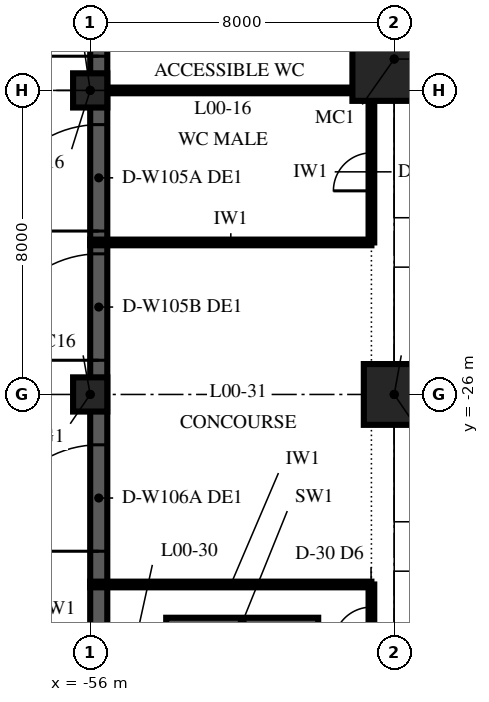
"""IFC4 building model, lengths in metres.
Left out: names, types, materials, properties, quantities, classifications, styles, units other than length and angle.
Written with IfcOpenShell. Run it as: python <this file> out.ifc"""

import sys

from ifc_helpers import new_model, si_unit, direction, frame, frame_2d, origin, origin_2d, place, context, subcontext, project, spatial, rectangle, extrude, element, fill, save


model = new_model("IFC4")
c1 = context("Model", 3, precision=1e-05, world=origin(), true_north=direction((0.0, 1.0)))
c2 = subcontext(c1, "Body", "Model", "MODEL_VIEW")
j1 = project(units=[si_unit("LENGTHUNIT", "METRE"), si_unit("PLANEANGLEUNIT", "RADIAN")], contexts=[c1])
p1 = place(None, origin())
s1 = spatial("IfcSite", under=j1, at=p1, CompositionType="ELEMENT")
p2 = place(p1, origin())
s2 = spatial("IfcBuilding", under=s1, at=p2, CompositionType="ELEMENT")
p3 = place(p2, origin())
s3 = spatial("IfcBuildingStorey", under=s2, at=p3, CompositionType="ELEMENT", Elevation=0.0)
for number, where, z_axis, x_axis in (
    (1, (-56.0, -26.0, 0.0), (0.0, 0.0, 1.0), (1.0, 0.0, 0.0)),
    (2, (-56.0, -18.0, 0.0), (0.0, 0.0, 1.0), (1.0, 0.0, 0.0)),
):
    element("IfcColumn", number, at=place(p3, frame(where, z_axis=z_axis, x_axis=x_axis)), inside=s3, PredefinedType="COLUMN", context=c2, shape_type="SweptSolid", body=[
        extrude(rectangle(XDim=0.9, YDim=0.9, at=origin_2d()), origin(), (0.0, 0.0, 1.0), 6.0),
    ])
p4 = place(p3, frame((-48.0, -26.0, 0.0), z_axis=(0.0, 0.0, 1.0), x_axis=(1.0, 0.0, 0.0)))
e3 = element("IfcColumn", 3, at=p4, inside=s3, PredefinedType="COLUMN", context=c2, shape_type="SweptSolid", body=[
    extrude(rectangle(XDim=1.6, YDim=1.6, at=origin_2d()), origin(), (0.0, 0.0, 1.0), 6.0),
])
p5 = place(p3, frame((-48.0, -17.175, 0.0), z_axis=(0.0, 0.0, 1.0), x_axis=(1.0, 0.0, 0.0)))
e4 = element("IfcColumn", 4, at=p5, inside=s3, PredefinedType="COLUMN", context=c2, shape_type="SweptSolid", body=[
    extrude(rectangle(XDim=2.2, YDim=2.2, at=origin_2d()), origin(), (0.0, 0.0, 1.0), 6.0),
])
p6 = place(p3, frame((-55.775, 8.0, 0.0), z_axis=(0.0, 0.0, 1.0), x_axis=(0.0, -1.0, 0.0)))
e5 = element("IfcWall", 5, at=p6, inside=s3, PredefinedType="SOLIDWALL", context=c2, shape_type="SweptSolid", body=[
    extrude(rectangle(XDim=81.55, YDim=0.45, at=frame_2d((40.775, 0.0))), origin(), (0.0, 0.0, 1.0), 6.0),
])
p7 = place(p6, frame((2.9, 0.0, 0.0)))
e6 = element("IfcOpeningElement", 6, at=p7, cuts=e5, PredefinedType="OPENING", context=c2, shape_type="SweptSolid", body=[
    extrude(rectangle(XDim=2.8, YDim=2.4, at=frame_2d((1.4, 1.2))), frame((0.0, 0.24, 0.0), z_axis=(0.0, -1.0, 0.0), x_axis=(1.0, 0.0, 0.0)), (0.0, 0.0, 1.0), 0.48),
])
p8 = place(p6, frame((6.3, 0.0, 0.0)))
e7 = element("IfcOpeningElement", 7, at=p8, cuts=e5, PredefinedType="OPENING", context=c2, shape_type="SweptSolid", body=[
    extrude(rectangle(XDim=2.8, YDim=2.4, at=frame_2d((1.4, 1.2))), frame((0.0, 0.24, 0.0), z_axis=(0.0, -1.0, 0.0), x_axis=(1.0, 0.0, 0.0)), (0.0, 0.0, 1.0), 0.48),
])
p9 = place(p6, frame((10.9, 0.0, 0.0)))
e8 = element("IfcOpeningElement", 8, at=p9, cuts=e5, PredefinedType="OPENING", context=c2, shape_type="SweptSolid", body=[
    extrude(rectangle(XDim=2.8, YDim=2.4, at=frame_2d((1.4, 1.2))), frame((0.0, 0.24, 0.0), z_axis=(0.0, -1.0, 0.0), x_axis=(1.0, 0.0, 0.0)), (0.0, 0.0, 1.0), 0.48),
])
p10 = place(p6, frame((14.3, 0.0, 0.0)))
e9 = element("IfcOpeningElement", 9, at=p10, cuts=e5, PredefinedType="OPENING", context=c2, shape_type="SweptSolid", body=[
    extrude(rectangle(XDim=2.8, YDim=2.4, at=frame_2d((1.4, 1.2))), frame((0.0, 0.24, 0.0), z_axis=(0.0, -1.0, 0.0), x_axis=(1.0, 0.0, 0.0)), (0.0, 0.0, 1.0), 0.48),
])
p11 = place(p6, frame((18.9, 0.0, 0.0)))
e10 = element("IfcOpeningElement", 10, at=p11, cuts=e5, PredefinedType="OPENING", context=c2, shape_type="SweptSolid", body=[
    extrude(rectangle(XDim=2.8, YDim=2.4, at=frame_2d((1.4, 1.2))), frame((0.0, 0.24, 0.0), z_axis=(0.0, -1.0, 0.0), x_axis=(1.0, 0.0, 0.0)), (0.0, 0.0, 1.0), 0.48),
])
p12 = place(p6, frame((22.3, 0.0, 0.0)))
e11 = element("IfcOpeningElement", 11, at=p12, cuts=e5, PredefinedType="OPENING", context=c2, shape_type="SweptSolid", body=[
    extrude(rectangle(XDim=2.8, YDim=2.4, at=frame_2d((1.4, 1.2))), frame((0.0, 0.24, 0.0), z_axis=(0.0, -1.0, 0.0), x_axis=(1.0, 0.0, 0.0)), (0.0, 0.0, 1.0), 0.48),
])
p13 = place(p6, frame((26.9, 0.0, 0.0)))
e12 = element("IfcOpeningElement", 12, at=p13, cuts=e5, PredefinedType="OPENING", context=c2, shape_type="SweptSolid", body=[
    extrude(rectangle(XDim=2.8, YDim=2.4, at=frame_2d((1.4, 1.2))), frame((0.0, 0.24, 0.0), z_axis=(0.0, -1.0, 0.0), x_axis=(1.0, 0.0, 0.0)), (0.0, 0.0, 1.0), 0.48),
])
p14 = place(p6, frame((30.3, 0.0, 0.0)))
e13 = element("IfcOpeningElement", 13, at=p14, cuts=e5, PredefinedType="OPENING", context=c2, shape_type="SweptSolid", body=[
    extrude(rectangle(XDim=2.8, YDim=2.4, at=frame_2d((1.4, 1.2))), frame((0.0, 0.24, 0.0), z_axis=(0.0, -1.0, 0.0), x_axis=(1.0, 0.0, 0.0)), (0.0, 0.0, 1.0), 0.48),
])
p15 = place(p6, frame((35.325, 0.0, 0.0)))
e14 = element("IfcOpeningElement", 14, at=p15, cuts=e5, PredefinedType="OPENING", context=c2, shape_type="SweptSolid", body=[
    extrude(rectangle(XDim=2.8, YDim=2.4, at=frame_2d((1.4, 1.2))), frame((0.0, 0.24, 0.0), z_axis=(0.0, -1.0, 0.0), x_axis=(1.0, 0.0, 0.0)), (0.0, 0.0, 1.0), 0.48),
])
p16 = place(p6, frame((42.9, 0.0, 0.0)))
e15 = element("IfcOpeningElement", 15, at=p16, cuts=e5, PredefinedType="OPENING", context=c2, shape_type="SweptSolid", body=[
    extrude(rectangle(XDim=2.8, YDim=2.4, at=frame_2d((1.4, 1.2))), frame((0.0, 0.24, 0.0), z_axis=(0.0, -1.0, 0.0), x_axis=(1.0, 0.0, 0.0)), (0.0, 0.0, 1.0), 0.48),
])
p17 = place(p6, frame((46.3, 0.0, 0.0)))
e16 = element("IfcOpeningElement", 16, at=p17, cuts=e5, PredefinedType="OPENING", context=c2, shape_type="SweptSolid", body=[
    extrude(rectangle(XDim=2.8, YDim=2.4, at=frame_2d((1.4, 1.2))), frame((0.0, 0.24, 0.0), z_axis=(0.0, -1.0, 0.0), x_axis=(1.0, 0.0, 0.0)), (0.0, 0.0, 1.0), 0.48),
])
p18 = place(p6, frame((50.9, 0.0, 0.0)))
e17 = element("IfcOpeningElement", 17, at=p18, cuts=e5, PredefinedType="OPENING", context=c2, shape_type="SweptSolid", body=[
    extrude(rectangle(XDim=2.8, YDim=2.4, at=frame_2d((1.4, 1.2))), frame((0.0, 0.24, 0.0), z_axis=(0.0, -1.0, 0.0), x_axis=(1.0, 0.0, 0.0)), (0.0, 0.0, 1.0), 0.48),
])
p19 = place(p6, frame((54.3, 0.0, 0.0)))
e18 = element("IfcOpeningElement", 18, at=p19, cuts=e5, PredefinedType="OPENING", context=c2, shape_type="SweptSolid", body=[
    extrude(rectangle(XDim=2.8, YDim=2.4, at=frame_2d((1.4, 1.2))), frame((0.0, 0.24, 0.0), z_axis=(0.0, -1.0, 0.0), x_axis=(1.0, 0.0, 0.0)), (0.0, 0.0, 1.0), 0.48),
])
p20 = place(p6, frame((58.9, 0.0, 0.0)))
e19 = element("IfcOpeningElement", 19, at=p20, cuts=e5, PredefinedType="OPENING", context=c2, shape_type="SweptSolid", body=[
    extrude(rectangle(XDim=2.8, YDim=2.4, at=frame_2d((1.4, 1.2))), frame((0.0, 0.24, 0.0), z_axis=(0.0, -1.0, 0.0), x_axis=(1.0, 0.0, 0.0)), (0.0, 0.0, 1.0), 0.48),
])
p21 = place(p6, frame((62.3, 0.0, 0.0)))
e20 = element("IfcOpeningElement", 20, at=p21, cuts=e5, PredefinedType="OPENING", context=c2, shape_type="SweptSolid", body=[
    extrude(rectangle(XDim=2.8, YDim=2.4, at=frame_2d((1.4, 1.2))), frame((0.0, 0.24, 0.0), z_axis=(0.0, -1.0, 0.0), x_axis=(1.0, 0.0, 0.0)), (0.0, 0.0, 1.0), 0.48),
])
p22 = place(p6, frame((66.9, 0.0, 0.0)))
e21 = element("IfcOpeningElement", 21, at=p22, cuts=e5, PredefinedType="OPENING", context=c2, shape_type="SweptSolid", body=[
    extrude(rectangle(XDim=2.8, YDim=2.4, at=frame_2d((1.4, 1.2))), frame((0.0, 0.24, 0.0), z_axis=(0.0, -1.0, 0.0), x_axis=(1.0, 0.0, 0.0)), (0.0, 0.0, 1.0), 0.48),
])
p23 = place(p6, frame((70.3, 0.0, 0.0)))
e22 = element("IfcOpeningElement", 22, at=p23, cuts=e5, PredefinedType="OPENING", context=c2, shape_type="SweptSolid", body=[
    extrude(rectangle(XDim=2.8, YDim=2.4, at=frame_2d((1.4, 1.2))), frame((0.0, 0.24, 0.0), z_axis=(0.0, -1.0, 0.0), x_axis=(1.0, 0.0, 0.0)), (0.0, 0.0, 1.0), 0.48),
])
p24 = place(p6, frame((74.675, 0.0, 0.0)))
e23 = element("IfcOpeningElement", 23, at=p24, cuts=e5, PredefinedType="OPENING", context=c2, shape_type="SweptSolid", body=[
    extrude(rectangle(XDim=2.8, YDim=2.4, at=frame_2d((1.4, 1.2))), frame((0.0, 0.24, 0.0), z_axis=(0.0, -1.0, 0.0), x_axis=(1.0, 0.0, 0.0)), (0.0, 0.0, 1.0), 0.48),
])
p25 = place(p6, frame((78.075, 0.0, 0.0)))
e24 = element("IfcOpeningElement", 24, at=p25, cuts=e5, PredefinedType="OPENING", context=c2, shape_type="SweptSolid", body=[
    extrude(rectangle(XDim=2.8, YDim=2.4, at=frame_2d((1.4, 1.2))), frame((0.0, 0.24, 0.0), z_axis=(0.0, -1.0, 0.0), x_axis=(1.0, 0.0, 0.0)), (0.0, 0.0, 1.0), 0.48),
])
p26 = place(p3, frame((-50.0, -32.0, 0.0), z_axis=(0.0, 0.0, 1.0), x_axis=(-1.0, 0.0, 0.0)))
e25 = element("IfcWall", 25, at=p26, inside=s3, PredefinedType="SOLIDWALL", context=c2, shape_type="SweptSolid", body=[
    extrude(rectangle(XDim=4.0, YDim=0.25, at=frame_2d((2.0, 0.0))), origin(), (0.0, 0.0, 1.0), 6.0),
])
p27 = place(p3, frame((-48.6, -33.19, 0.0), z_axis=(0.0, 0.0, 1.0), x_axis=(0.0, 1.0, 0.0)))
e26 = element("IfcWall", 26, at=p27, inside=s3, PredefinedType="PARTITIONING", context=c2, shape_type="SweptSolid", body=[
    extrude(rectangle(XDim=2.19, YDim=0.15, at=frame_2d((1.095, 0.0))), origin(), (0.0, 0.0, 1.0), 5.7),
])
p28 = place(p27, frame((0.595, 0.0, 0.0)))
e27 = element("IfcOpeningElement", 27, at=p28, cuts=e26, PredefinedType="OPENING", context=c2, shape_type="SweptSolid", body=[
    extrude(rectangle(XDim=1.0, YDim=2.1, at=frame_2d((0.5, 1.05))), frame((0.0, 0.09, 0.0), z_axis=(0.0, -1.0, 0.0), x_axis=(1.0, 0.0, 0.0)), (0.0, 0.0, 1.0), 0.18),
])
p29 = place(p3, frame((-48.6, -22.0, 0.0), z_axis=(0.0, 0.0, 1.0), x_axis=(0.0, 1.0, 0.0)))
e28 = element("IfcWall", 28, at=p29, inside=s3, PredefinedType="PARTITIONING", context=c2, shape_type="SweptSolid", body=[
    extrude(rectangle(XDim=3.715, YDim=0.15, at=frame_2d((1.857, 0.0))), origin(), (0.0, 0.0, 1.0), 5.7),
])
p30 = place(p29, frame((1.357, 0.0, 0.0)))
e29 = element("IfcOpeningElement", 29, at=p30, cuts=e28, PredefinedType="OPENING", context=c2, shape_type="SweptSolid", body=[
    extrude(rectangle(XDim=1.0, YDim=2.1, at=frame_2d((0.5, 1.05))), frame((0.0, 0.09, 0.0), z_axis=(0.0, -1.0, 0.0), x_axis=(1.0, 0.0, 0.0)), (0.0, 0.0, 1.0), 0.18),
])
for number, where, z_axis, x_axis in (
    (30, (-56.0, -31.0, 0.0), (0.0, 0.0, 1.0), (1.0, 0.0, 0.0)),
    (31, (-56.0, -22.0, 0.0), (0.0, 0.0, 1.0), (1.0, 0.0, 0.0)),
):
    element("IfcWall", number, at=place(p3, frame(where, z_axis=z_axis, x_axis=x_axis)), inside=s3, PredefinedType="PARTITIONING", context=c2, shape_type="SweptSolid", body=[
        extrude(rectangle(XDim=7.4, YDim=0.15, at=frame_2d((3.7, 0.0))), origin(), (0.0, 0.0, 1.0), 5.7),
    ])
p31 = place(p3, frame((-55.54, -18.0, 0.0), z_axis=(0.0, 0.0, 1.0), x_axis=(1.0, 0.0, 0.0)))
e32 = element("IfcWall", 32, at=p31, inside=s3, PredefinedType="PARTITIONING", context=c2, shape_type="SweptSolid", body=[
    extrude(rectangle(XDim=6.43, YDim=0.15, at=frame_2d((3.215, 0.0))), origin(), (0.0, 0.0, 1.0), 5.7),
])
p32 = place(p12, frame((2.8, 0.0, 0.0), z_axis=(0.0, 0.0, 1.0), x_axis=(-1.0, 0.0, 0.0)))
e33 = element("IfcDoor", 33, at=p32, inside=s3, OperationType="DOUBLE_DOOR_SINGLE_SWING", PredefinedType="DOOR", context=c2, shape_type="SweptSolid", body=[
    extrude(rectangle(XDim=2.8, YDim=2.4, at=frame_2d((1.4, 1.2))), frame((0.0, 0.225, 0.0), z_axis=(0.0, -1.0, 0.0), x_axis=(1.0, 0.0, 0.0)), (0.0, 0.0, 1.0), 0.449),
])
fill(e11, e33)
p33 = place(p13, frame((2.8, 0.0, 0.0), z_axis=(0.0, 0.0, 1.0), x_axis=(-1.0, 0.0, 0.0)))
e34 = element("IfcDoor", 34, at=p33, inside=s3, OperationType="DOUBLE_DOOR_SINGLE_SWING", PredefinedType="DOOR", context=c2, shape_type="SweptSolid", body=[
    extrude(rectangle(XDim=2.8, YDim=2.4, at=frame_2d((1.4, 1.2))), frame((0.0, 0.225, 0.0), z_axis=(0.0, -1.0, 0.0), x_axis=(1.0, 0.0, 0.0)), (0.0, 0.0, 1.0), 0.449),
])
fill(e12, e34)
p34 = place(p14, frame((2.8, 0.0, 0.0), z_axis=(0.0, 0.0, 1.0), x_axis=(-1.0, 0.0, 0.0)))
e35 = element("IfcDoor", 35, at=p34, inside=s3, OperationType="DOUBLE_DOOR_SINGLE_SWING", PredefinedType="DOOR", context=c2, shape_type="SweptSolid", body=[
    extrude(rectangle(XDim=2.8, YDim=2.4, at=frame_2d((1.4, 1.2))), frame((0.0, 0.225, 0.0), z_axis=(0.0, -1.0, 0.0), x_axis=(1.0, 0.0, 0.0)), (0.0, 0.0, 1.0), 0.449),
])
fill(e13, e35)
p35 = place(p15, frame((2.8, 0.0, 0.0), z_axis=(0.0, 0.0, 1.0), x_axis=(-1.0, 0.0, 0.0)))
e36 = element("IfcDoor", 36, at=p35, inside=s3, OperationType="DOUBLE_DOOR_SINGLE_SWING", PredefinedType="DOOR", context=c2, shape_type="SweptSolid", body=[
    extrude(rectangle(XDim=2.8, YDim=2.4, at=frame_2d((1.4, 1.2))), frame((0.0, 0.225, 0.0), z_axis=(0.0, -1.0, 0.0), x_axis=(1.0, 0.0, 0.0)), (0.0, 0.0, 1.0), 0.449),
])
fill(e14, e36)
p36 = place(p28, origin())
e37 = element("IfcDoor", 37, at=p36, inside=s3, OperationType="SINGLE_SWING_LEFT", PredefinedType="DOOR", context=c2, shape_type="SweptSolid", body=[
    extrude(rectangle(XDim=1.0, YDim=2.1, at=frame_2d((0.5, 1.05))), frame((0.0, 0.075, 0.0), z_axis=(0.0, -1.0, 0.0), x_axis=(1.0, 0.0, 0.0)), (0.0, 0.0, 1.0), 0.149),
])
fill(e27, e37)
p37 = place(p30, origin())
e38 = element("IfcDoor", 38, at=p37, inside=s3, OperationType="SINGLE_SWING_LEFT", PredefinedType="DOOR", context=c2, shape_type="SweptSolid", body=[
    extrude(rectangle(XDim=1.0, YDim=2.1, at=frame_2d((0.5, 1.05))), frame((0.0, 0.075, 0.0), z_axis=(0.0, -1.0, 0.0), x_axis=(1.0, 0.0, 0.0)), (0.0, 0.0, 1.0), 0.149),
])
fill(e29, e38)
save(model, sys.argv[1])
